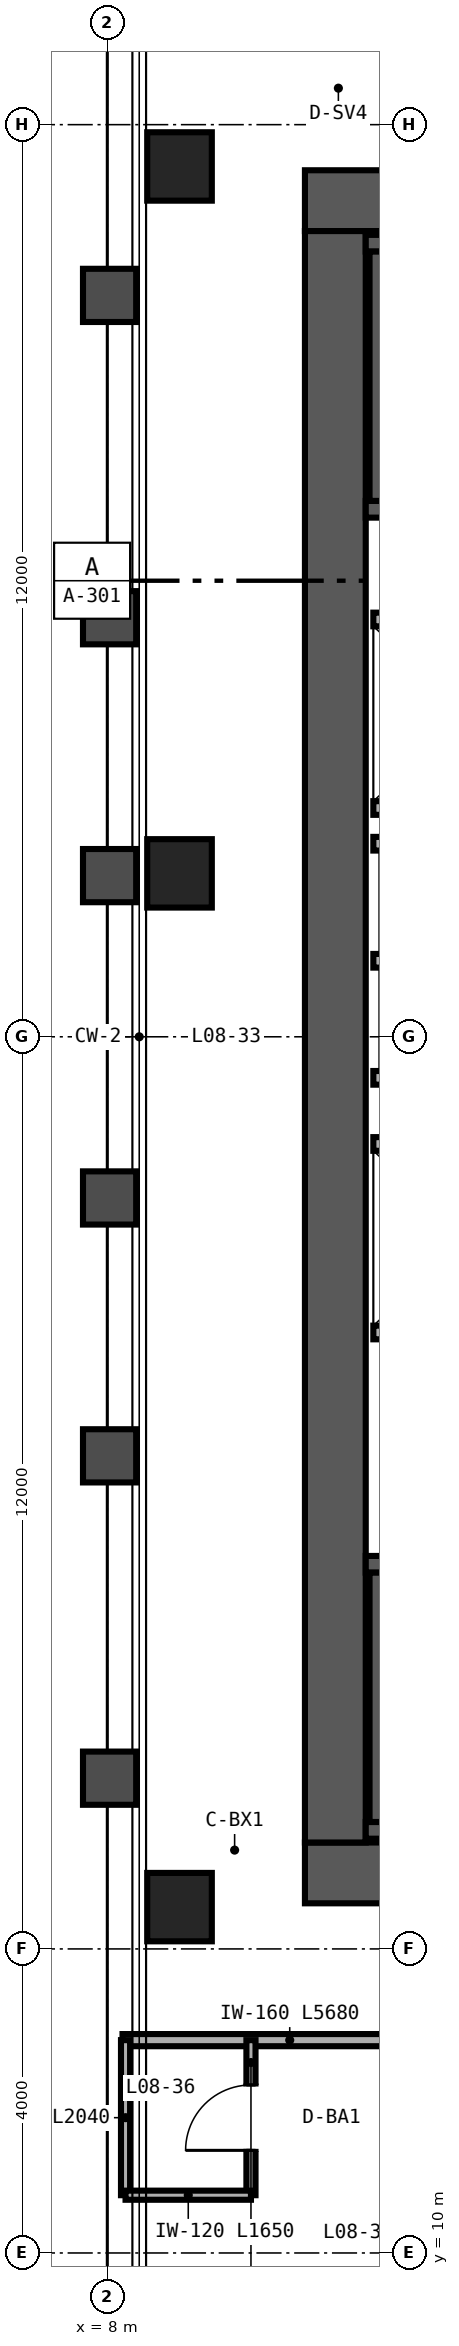
"""IFC4 building model, lengths in metres.
Left out: names, types, materials, properties, quantities, classifications, styles, units other than length and angle.
Written with IfcOpenShell. Run it as: python <this file> out.ifc"""

import sys

from ifc_helpers import new_model, si_unit, direction, frame, frame_2d, origin, origin_2d, place, context, subcontext, project, spatial, rectangle, hollow_rectangle, extrude, source, transform, mapped, element, fill, save


model = new_model("IFC4")
c1 = context("Model", 3, precision=1e-05, world=origin(), true_north=direction((0.0, 1.0)))
c2 = subcontext(c1, "Body", "Model", "MODEL_VIEW")
j1 = project(units=[si_unit("LENGTHUNIT", "METRE"), si_unit("PLANEANGLEUNIT", "RADIAN")], contexts=[c1])
p1 = place(None, origin())
s1 = spatial("IfcSite", under=j1, at=p1, CompositionType="ELEMENT")
p2 = place(p1, origin())
s2 = spatial("IfcBuilding", under=s1, at=p2, CompositionType="ELEMENT")
p3 = place(p2, frame((0.0, 0.0, 38.4)))
s3 = spatial("IfcBuildingStorey", under=s2, at=p3, CompositionType="ELEMENT", Elevation=38.4)
p4 = place(p3, frame((10.6, 15.0, 0.0), z_axis=(0.0, 0.0, 1.0), x_axis=(1.0, 0.0, 0.0)))
e1 = element("IfcWall", 1, at=p4, inside=s3, PredefinedType="SHEAR", context=c2, shape_type="SweptSolid", body=[
    extrude(rectangle(XDim=12.8, YDim=0.8, at=frame_2d((6.4, 0.0))), origin(), (0.0, 0.0, 1.0), 3.35),
])
p5 = place(p4, frame((10.3, 0.0, 0.0)))
e2 = element("IfcOpeningElement", 2, at=p5, cuts=e1, PredefinedType="OPENING", context=c2, shape_type="SweptSolid", body=[
    extrude(rectangle(XDim=1.0, YDim=2.15, at=frame_2d((0.5, 1.075))), frame((0.0, 0.41, 0.0), z_axis=(0.0, -1.0, 0.0), x_axis=(1.0, 0.0, 0.0)), (0.0, 0.0, 1.0), 0.82),
])
p6 = place(p3, frame((10.6, 37.0, 0.0), z_axis=(0.0, 0.0, 1.0), x_axis=(1.0, 0.0, 0.0)))
e3 = element("IfcWall", 3, at=p6, inside=s3, PredefinedType="SHEAR", context=c2, shape_type="SweptSolid", body=[
    extrude(rectangle(XDim=12.8, YDim=0.8, at=frame_2d((6.4, 0.0))), origin(), (0.0, 0.0, 1.0), 3.35),
])
p7 = place(p6, frame((8.98, 0.0, 0.0)))
e4 = element("IfcOpeningElement", 4, at=p7, cuts=e3, PredefinedType="OPENING", context=c2, shape_type="SweptSolid", body=[
    extrude(rectangle(XDim=1.0, YDim=2.15, at=frame_2d((0.5, 1.075))), frame((0.0, 0.41, 0.0), z_axis=(0.0, -1.0, 0.0), x_axis=(1.0, 0.0, 0.0)), (0.0, 0.0, 1.0), 0.82),
])
p8 = place(p3, frame((11.0, 15.4, 0.0), z_axis=(0.0, 0.0, 1.0), x_axis=(0.0, 1.0, 0.0)))
e5 = element("IfcWall", 5, at=p8, inside=s3, PredefinedType="SHEAR", context=c2, shape_type="SweptSolid", body=[
    extrude(rectangle(XDim=21.2, YDim=0.8, at=frame_2d((10.6, 0.0))), origin(), (0.0, 0.0, 1.0), 3.35),
])
p9 = place(p3, frame((11.4, 15.56, 0.0), z_axis=(0.0, 0.0, 1.0), x_axis=(1.0, 0.0, 0.0)))
e6 = element("IfcWall", 6, at=p9, inside=s3, PredefinedType="SHEAR", context=c2, shape_type="SweptSolid", body=[
    extrude(rectangle(XDim=7.91, YDim=0.22, at=frame_2d((3.955, 0.0))), origin(), (0.0, 0.0, 1.0), 3.4),
])
p10 = place(p3, frame((11.4, 19.06, 0.0), z_axis=(0.0, 0.0, 1.0), x_axis=(1.0, 0.0, 0.0)))
e7 = element("IfcWall", 7, at=p10, inside=s3, PredefinedType="SHEAR", context=c2, shape_type="SweptSolid", body=[
    extrude(rectangle(XDim=7.91, YDim=0.22, at=frame_2d((3.955, 0.0))), origin(), (0.0, 0.0, 1.0), 3.4),
])
p11 = place(p10, frame((0.52, 0.0, 0.0)))
e8 = element("IfcOpeningElement", 8, at=p11, cuts=e7, PredefinedType="OPENING", context=c2, shape_type="SweptSolid", body=[
    extrude(rectangle(XDim=1.05, YDim=2.15, at=frame_2d((0.525, 1.075))), frame((0.0, 0.12, 0.0), z_axis=(0.0, -1.0, 0.0), x_axis=(1.0, 0.0, 0.0)), (0.0, 0.0, 1.0), 0.24),
])
p12 = place(p3, frame((11.56, 15.67, 0.0), z_axis=(0.0, 0.0, 1.0), x_axis=(0.0, 1.0, 0.0)))
e9 = element("IfcWall", 9, at=p12, inside=s3, PredefinedType="SHEAR", context=c2, shape_type="SweptSolid", body=[
    extrude(rectangle(XDim=3.28, YDim=0.22, at=frame_2d((1.64, 0.0))), origin(), (0.0, 0.0, 1.0), 3.4),
])
p13 = place(p3, frame((11.4, 32.94, 0.0), z_axis=(0.0, 0.0, 1.0), x_axis=(1.0, 0.0, 0.0)))
e10 = element("IfcWall", 10, at=p13, inside=s3, PredefinedType="SHEAR", context=c2, shape_type="SweptSolid", body=[
    extrude(rectangle(XDim=7.91, YDim=0.22, at=frame_2d((3.955, 0.0))), origin(), (0.0, 0.0, 1.0), 3.4),
])
p14 = place(p13, frame((0.52, 0.0, 0.0)))
e11 = element("IfcOpeningElement", 11, at=p14, cuts=e10, PredefinedType="OPENING", context=c2, shape_type="SweptSolid", body=[
    extrude(rectangle(XDim=1.05, YDim=2.15, at=frame_2d((0.525, 1.075))), frame((0.0, 0.12, 0.0), z_axis=(0.0, -1.0, 0.0), x_axis=(1.0, 0.0, 0.0)), (0.0, 0.0, 1.0), 0.24),
])
p15 = place(p3, frame((11.4, 36.44, 0.0), z_axis=(0.0, 0.0, 1.0), x_axis=(1.0, 0.0, 0.0)))
e12 = element("IfcWall", 12, at=p15, inside=s3, PredefinedType="SHEAR", context=c2, shape_type="SweptSolid", body=[
    extrude(rectangle(XDim=7.91, YDim=0.22, at=frame_2d((3.955, 0.0))), origin(), (0.0, 0.0, 1.0), 3.4),
])
p16 = place(p3, frame((11.56, 33.05, 0.0), z_axis=(0.0, 0.0, 1.0), x_axis=(0.0, 1.0, 0.0)))
e13 = element("IfcWall", 13, at=p16, inside=s3, PredefinedType="SHEAR", context=c2, shape_type="SweptSolid", body=[
    extrude(rectangle(XDim=3.28, YDim=0.22, at=frame_2d((1.64, 0.0))), origin(), (0.0, 0.0, 1.0), 3.4),
])
m1 = source(origin(), c2, "Body", "SweptSolid", [
    extrude(hollow_rectangle(XDim=0.85, YDim=0.9, WallThickness=0.04, at=origin_2d()), origin(), (0.0, 0.0, 1.0), 3.35),
])
for number, where, z_axis, x_axis in (
    (14, (8.95, 14.55, 0.0), (0.0, 0.0, 1.0), (1.0, 0.0, 0.0)),
    (15, (8.95, 28.15, 0.0), (0.0, 0.0, 1.0), (1.0, 0.0, 0.0)),
    (16, (8.95, 37.45, 0.0), (0.0, 0.0, 1.0), (1.0, 0.0, 0.0)),
):
    element("IfcColumn", number, at=place(p3, frame(where, z_axis=z_axis, x_axis=x_axis)), inside=s3, PredefinedType="COLUMN", context=c2, shape_type="MappedRepresentation", body=[
        mapped(m1, transform((0.0, 0.0, 0.0), scale=1.0)),
    ])
for number, where, z_axis, x_axis in (
    (17, (11.5, 22.11, 0.0), (0.0, 0.0, 1.0), (1.0, 0.0, 0.0)),
    (18, (11.5, 24.59, 0.0), (0.0, 0.0, 1.0), (1.0, 0.0, 0.0)),
    (19, (11.5, 29.01, 0.0), (0.0, 0.0, 1.0), (1.0, 0.0, 0.0)),
    (20, (11.5, 31.49, 0.0), (0.0, 0.0, 1.0), (1.0, 0.0, 0.0)),
):
    element("IfcWall", number, at=place(p3, frame(where, z_axis=z_axis, x_axis=x_axis)), inside=s3, PredefinedType="SOLIDWALL", context=c2, shape_type="SweptSolid", body=[
        extrude(rectangle(XDim=2.5, YDim=0.18, at=frame_2d((1.25, 0.0))), origin(), (0.0, 0.0, 1.0), 3.35),
    ])
for number, where, z_axis, x_axis in (
    (21, (11.5, 25.46, 0.0), (0.0, 0.0, 1.0), (1.0, 0.0, 0.0)),
    (22, (11.5, 27.0, 0.0), (0.0, 0.0, 1.0), (1.0, 0.0, 0.0)),
    (23, (11.5, 28.54, 0.0), (0.0, 0.0, 1.0), (1.0, 0.0, 0.0)),
):
    element("IfcWall", number, at=place(p3, frame(where, z_axis=z_axis, x_axis=x_axis)), inside=s3, PredefinedType="SOLIDWALL", context=c2, shape_type="SweptSolid", body=[
        extrude(rectangle(XDim=2.51, YDim=0.18, at=frame_2d((1.255, 0.0))), origin(), (0.0, 0.0, 1.0), 3.35),
    ])
p17 = place(p3, frame((8.2, 12.8, 0.0), z_axis=(0.0, 0.0, 1.0), x_axis=(1.0, 0.0, 0.0)))
e24 = element("IfcWall", 24, at=p17, inside=s3, PredefinedType="PARTITIONING", context=c2, shape_type="SweptSolid", body=[
    extrude(rectangle(XDim=5.68, YDim=0.16, at=frame_2d((2.84, 0.0))), origin(), (0.0, 0.0, 1.0), 3.35),
])
p18 = place(p17, frame((4.4, 0.0, 0.0)))
e25 = element("IfcOpeningElement", 25, at=p18, cuts=e24, PredefinedType="OPENING", context=c2, shape_type="SweptSolid", body=[
    extrude(rectangle(XDim=0.94, YDim=2.15, at=frame_2d((0.47, 1.075))), frame((0.0, 0.09, 0.0), z_axis=(0.0, -1.0, 0.0), x_axis=(1.0, 0.0, 0.0)), (0.0, 0.0, 1.0), 0.18),
])
p19 = place(p3, frame((9.89, 10.76, 0.0), z_axis=(0.0, 0.0, 1.0), x_axis=(0.0, 1.0, 0.0)))
e26 = element("IfcWall", 26, at=p19, inside=s3, PredefinedType="PARTITIONING", context=c2, shape_type="SweptSolid", body=[
    extrude(rectangle(XDim=2.04, YDim=0.12, at=frame_2d((1.02, 0.0))), origin(), (0.0, 0.0, 1.0), 3.35),
])
p20 = place(p19, frame((0.59, 0.0, 0.0)))
e27 = element("IfcOpeningElement", 27, at=p20, cuts=e26, PredefinedType="OPENING", context=c2, shape_type="SweptSolid", body=[
    extrude(rectangle(XDim=0.86, YDim=2.1, at=frame_2d((0.43, 1.05))), frame((0.0, 0.07, 0.0), z_axis=(0.0, -1.0, 0.0), x_axis=(1.0, 0.0, 0.0)), (0.0, 0.0, 1.0), 0.14),
])
p21 = place(p3, frame((8.24, 10.76, 0.0), z_axis=(0.0, 0.0, 1.0), x_axis=(0.0, 1.0, 0.0)))
e28 = element("IfcWall", 28, at=p21, inside=s3, PredefinedType="PARTITIONING", context=c2, shape_type="SweptSolid", body=[
    extrude(rectangle(XDim=2.04, YDim=0.12, at=frame_2d((1.02, 0.0))), origin(), (0.0, 0.0, 1.0), 3.35),
])
p22 = place(p3, frame((8.24, 10.76, 0.0), z_axis=(0.0, 0.0, 1.0), x_axis=(1.0, 0.0, 0.0)))
e29 = element("IfcWall", 29, at=p22, inside=s3, PredefinedType="PARTITIONING", context=c2, shape_type="SweptSolid", body=[
    extrude(rectangle(XDim=1.65, YDim=0.12, at=frame_2d((0.825, 0.0))), origin(), (0.0, 0.0, 1.0), 3.35),
])
m2 = source(origin(), c2, "Body", "SweptSolid", [
    extrude(rectangle(XDim=0.86, YDim=2.1, at=frame_2d((0.43, 1.05))), frame((0.0, 0.025, 0.0), z_axis=(0.0, -1.0, 0.0), x_axis=(1.0, 0.0, 0.0)), (0.0, 0.0, 1.0), 0.05),
])
p23 = place(p20, origin())
e30 = element("IfcDoor", 30, at=p23, inside=s3, OperationType="SINGLE_SWING_LEFT", PredefinedType="DOOR", context=c2, shape_type="MappedRepresentation", body=[
    mapped(m2, transform((0.0, 0.0, 0.0), scale=1.0)),
])
fill(e27, e30)
save(model, sys.argv[1])
